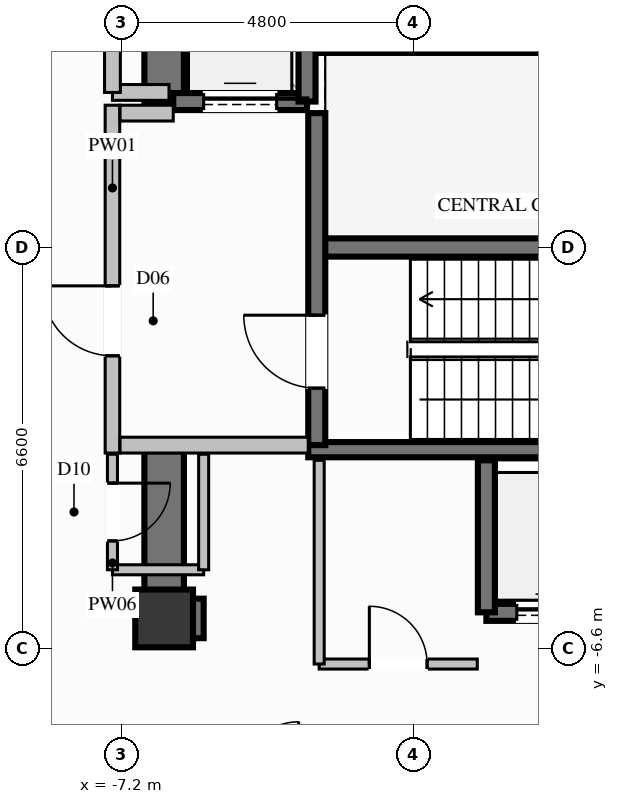
"""IFC4 building model, lengths in metres.
Left out: names, types, materials, properties, quantities, classifications, styles, units other than length and angle.
Written with IfcOpenShell. Run it as: python <this file> out.ifc"""

import sys

from ifc_helpers import new_model, si_unit, direction, frame, frame_2d, origin, origin_2d, place, context, subcontext, project, spatial, rectangle, extrude, element, fill, save


model = new_model("IFC4")
c1 = context("Model", 3, precision=1e-05, world=origin(), true_north=direction((0.0, 1.0)))
c2 = subcontext(c1, "Body", "Model", "MODEL_VIEW")
j1 = project(units=[si_unit("LENGTHUNIT", "METRE"), si_unit("PLANEANGLEUNIT", "RADIAN")], contexts=[c1])
p1 = place(None, origin())
s1 = spatial("IfcSite", under=j1, at=p1, CompositionType="ELEMENT")
p2 = place(p1, origin())
s2 = spatial("IfcBuilding", under=s1, at=p2, CompositionType="ELEMENT")
p3 = place(p2, frame((0.0, 0.0, 117.0)))
s3 = spatial("IfcBuildingStorey", under=s2, at=p3, CompositionType="ELEMENT", Elevation=117.0)
p4 = place(p3, frame((-6.5, -6.1, 0.0), z_axis=(0.0, 0.0, 1.0), x_axis=(1.0, 0.0, 0.0)))
e1 = element("IfcColumn", 1, at=p4, inside=s3, PredefinedType="COLUMN", context=c2, shape_type="SweptSolid", body=[
    extrude(rectangle(XDim=0.95, YDim=0.95, at=origin_2d()), origin(), (0.0, 0.0, 1.0), 3.6),
])
p5 = place(p3, frame((-3.99, 0.0, 0.0), z_axis=(0.0, 0.0, 1.0), x_axis=(1.0, 0.0, 0.0)))
e2 = element("IfcWall", 2, at=p5, inside=s3, PredefinedType="SHEAR", context=c2, shape_type="SweptSolid", body=[
    extrude(rectangle(XDim=7.98, YDim=0.3, at=frame_2d((3.99, 0.0))), origin(), (0.0, 0.0, 1.0), 3.6),
])
for number, where, z_axis, x_axis in (
    (3, (-4.13, -3.325, 0.0), (0.0, 0.0, 1.0), (1.0, 0.0, 0.0)),
    (4, (-4.13, 3.325, 0.0), (0.0, 0.0, 1.0), (1.0, 0.0, 0.0)),
):
    element("IfcWall", number, at=place(p3, frame(where, z_axis=z_axis, x_axis=x_axis)), inside=s3, PredefinedType="SOLIDWALL", context=c2, shape_type="SweptSolid", body=[
        extrude(rectangle(XDim=8.26, YDim=0.25, at=frame_2d((4.13, 0.0))), origin(), (0.0, 0.0, 1.0), 3.6),
    ])
p6 = place(p3, frame((-6.175, -6.1, 0.0), z_axis=(0.0, 0.0, 1.0), x_axis=(1.0, 0.0, 0.0)))
e5 = element("IfcWall", 5, at=p6, inside=s3, PredefinedType="SHEAR", context=c2, shape_type="SweptSolid", body=[
    extrude(rectangle(XDim=0.325, YDim=0.65, at=frame_2d((0.163, 0.0))), origin(), (0.0, 0.0, 1.0), 3.6),
])
p7 = place(p3, frame((-6.5, 2.35, 0.0), z_axis=(0.0, 0.0, 1.0), x_axis=(0.0, 1.0, 0.0)))
e6 = element("IfcWall", 6, at=p7, inside=s3, PredefinedType="SHEAR", context=c2, shape_type="SweptSolid", body=[
    extrude(rectangle(XDim=4.075, YDim=0.65, at=frame_2d((2.038, 0.0))), origin(), (0.0, 0.0, 1.0), 3.6),
])
p8 = place(p3, frame((-6.5, -6.425, 0.0), z_axis=(0.0, 0.0, 1.0), x_axis=(0.0, 1.0, 0.0)))
e7 = element("IfcWall", 7, at=p8, inside=s3, PredefinedType="SHEAR", context=c2, shape_type="SweptSolid", body=[
    extrude(rectangle(XDim=3.075, YDim=0.65, at=frame_2d((1.538, 0.0))), origin(), (0.0, 0.0, 1.0), 3.6),
])
p9 = place(p3, frame((-1.2, -6.0, 0.0), z_axis=(0.0, 0.0, 1.0), x_axis=(1.0, 0.0, 0.0)))
e8 = element("IfcWall", 8, at=p9, inside=s3, PredefinedType="SOLIDWALL", context=c2, shape_type="SweptSolid", body=[
    extrude(rectangle(XDim=2.1, YDim=0.28, at=frame_2d((1.05, 0.0))), origin(), (0.0, 0.0, 1.0), 3.35),
])
p10 = place(p9, frame((0.5, 0.0, 0.0)))
e9 = element("IfcOpeningElement", 9, at=p10, cuts=e8, PredefinedType="OPENING", context=c2, shape_type="SweptSolid", body=[
    extrude(rectangle(XDim=1.1, YDim=2.2, at=frame_2d((0.55, 1.1))), frame((0.0, 0.15, 0.0), z_axis=(0.0, -1.0, 0.0), x_axis=(1.0, 0.0, 0.0)), (0.0, 0.0, 1.0), 0.3),
])
p11 = place(p3, frame((-1.2, -3.5, 0.0), z_axis=(0.0, 0.0, 1.0), x_axis=(0.0, -1.0, 0.0)))
e10 = element("IfcWall", 10, at=p11, inside=s3, PredefinedType="SOLIDWALL", context=c2, shape_type="SweptSolid", body=[
    extrude(rectangle(XDim=2.5, YDim=0.28, at=frame_2d((1.25, 0.0))), origin(), (0.0, 0.0, 1.0), 3.35),
])
p12 = place(p3, frame((-6.35, 2.4, 0.0), z_axis=(0.0, 0.0, 1.0), x_axis=(1.0, 0.0, 0.0)))
e11 = element("IfcWall", 11, at=p12, inside=s3, PredefinedType="SOLIDWALL", context=c2, shape_type="SweptSolid", body=[
    extrude(rectangle(XDim=2.2, YDim=0.28, at=frame_2d((1.1, 0.0))), origin(), (0.0, 0.0, 1.0), 3.35),
])
p13 = place(p12, frame((0.5, 0.0, 0.0)))
e12 = element("IfcOpeningElement", 12, at=p13, cuts=e11, PredefinedType="OPENING", context=c2, shape_type="SweptSolid", body=[
    extrude(rectangle(XDim=1.2, YDim=2.2, at=frame_2d((0.6, 1.1))), frame((0.0, 0.15, 0.0), z_axis=(0.0, -1.0, 0.0), x_axis=(1.0, 0.0, 0.0)), (0.0, 0.0, 1.0), 0.3),
])
p14 = place(p3, frame((-4.15, 2.4, 0.0), z_axis=(0.0, 0.0, 1.0), x_axis=(0.0, 1.0, 0.0)))
e13 = element("IfcWall", 13, at=p14, inside=s3, PredefinedType="SOLIDWALL", context=c2, shape_type="SweptSolid", body=[
    extrude(rectangle(XDim=2.7, YDim=0.28, at=frame_2d((1.35, 0.0))), origin(), (0.0, 0.0, 1.0), 3.35),
])
p15 = place(p3, frame((-3.99, -3.25, 0.0), z_axis=(0.0, 0.0, 1.0), x_axis=(0.0, 1.0, 0.0)))
e14 = element("IfcWall", 14, at=p15, inside=s3, PredefinedType="SOLIDWALL", context=c2, shape_type="SweptSolid", body=[
    extrude(rectangle(XDim=5.46, YDim=0.28, at=frame_2d((2.73, 0.0))), origin(), (0.0, 0.0, 1.0), 3.35),
])
p16 = place(p15, frame((0.937, 0.0, 0.0)))
e15 = element("IfcOpeningElement", 15, at=p16, cuts=e14, PredefinedType="OPENING", context=c2, shape_type="SweptSolid", body=[
    extrude(rectangle(XDim=1.2, YDim=2.2, at=frame_2d((0.6, 1.1))), frame((0.0, 0.15, 0.0), z_axis=(0.0, -1.0, 0.0), x_axis=(1.0, 0.0, 0.0)), (0.0, 0.0, 1.0), 0.3),
])
p17 = place(p3, frame((-7.35, -3.38, 0.0), z_axis=(0.0, 0.0, 1.0), x_axis=(0.0, 1.0, 0.0)))
e16 = element("IfcWall", 16, at=p17, inside=s3, PredefinedType="PARTITIONING", context=c2, shape_type="SweptSolid", body=[
    extrude(rectangle(XDim=5.72, YDim=0.24, at=frame_2d((2.86, 0.0))), origin(), (0.0, 0.0, 1.0), 2.435),
])
p18 = place(p17, frame((1.599, 0.0, 0.0)))
e17 = element("IfcOpeningElement", 17, at=p18, cuts=e16, PredefinedType="OPENING", context=c2, shape_type="SweptSolid", body=[
    extrude(rectangle(XDim=1.15, YDim=2.2, at=frame_2d((0.575, 1.1))), frame((0.0, 0.13, 0.0), z_axis=(0.0, -1.0, 0.0), x_axis=(1.0, 0.0, 0.0)), (0.0, 0.0, 1.0), 0.26),
])
p19 = place(p3, frame((-7.225, -3.25, 0.0), z_axis=(0.0, 0.0, 1.0), x_axis=(1.0, 0.0, 0.0)))
e18 = element("IfcWall", 18, at=p19, inside=s3, PredefinedType="PARTITIONING", context=c2, shape_type="SweptSolid", body=[
    extrude(rectangle(XDim=3.095, YDim=0.26, at=frame_2d((1.548, 0.0))), origin(), (0.0, 0.0, 1.0), 3.35),
])
p20 = place(p3, frame((-7.225, 2.21, 0.0), z_axis=(0.0, 0.0, 1.0), x_axis=(1.0, 0.0, 0.0)))
e19 = element("IfcWall", 19, at=p20, inside=s3, PredefinedType="PARTITIONING", context=c2, shape_type="SweptSolid", body=[
    extrude(rectangle(XDim=0.875, YDim=0.26, at=frame_2d((0.438, 0.0))), origin(), (0.0, 0.0, 1.0), 3.35),
])
p21 = place(p3, frame((-7.35, 2.55, 0.0), z_axis=(0.0, 0.0, 1.0), x_axis=(1.0, 0.0, 0.0)))
e20 = element("IfcWall", 20, at=p21, inside=s3, PredefinedType="PARTITIONING", context=c2, shape_type="SweptSolid", body=[
    extrude(rectangle(XDim=0.93, YDim=0.26, at=frame_2d((0.465, 0.0))), origin(), (0.0, 0.0, 1.0), 3.35),
])
p22 = place(p3, frame((-7.35, 2.55, 0.0), z_axis=(0.0, 0.0, 1.0), x_axis=(0.0, 1.0, 0.0)))
e21 = element("IfcWall", 21, at=p22, inside=s3, PredefinedType="PARTITIONING", context=c2, shape_type="SweptSolid", body=[
    extrude(rectangle(XDim=2.4, YDim=0.26, at=frame_2d((1.2, 0.0))), origin(), (0.0, 0.0, 1.0), 2.435),
])
p23 = place(p22, frame((0.775, 0.0, 0.0)))
e22 = element("IfcOpeningElement", 22, at=p23, cuts=e21, PredefinedType="OPENING", context=c2, shape_type="SweptSolid", body=[
    extrude(rectangle(XDim=0.85, YDim=2.05, at=frame_2d((0.425, 1.025))), frame((0.0, 0.14, 0.0), z_axis=(0.0, -1.0, 0.0), x_axis=(1.0, 0.0, 0.0)), (0.0, 0.0, 1.0), 0.28),
])
p24 = place(p3, frame((-7.35, -5.3, 0.0), z_axis=(0.0, 0.0, 1.0), x_axis=(1.0, 0.0, 0.0)))
e23 = element("IfcWall", 23, at=p24, inside=s3, PredefinedType="PARTITIONING", context=c2, shape_type="SweptSolid", body=[
    extrude(rectangle(XDim=1.5, YDim=0.165, at=frame_2d((0.75, 0.0))), origin(), (0.0, 0.0, 1.0), 2.435),
])
p25 = place(p3, frame((-5.85, -5.3, 0.0), z_axis=(0.0, 0.0, 1.0), x_axis=(0.0, 1.0, 0.0)))
e24 = element("IfcWall", 24, at=p25, inside=s3, PredefinedType="PARTITIONING", context=c2, shape_type="SweptSolid", body=[
    extrude(rectangle(XDim=1.9, YDim=0.165, at=frame_2d((0.95, 0.0))), origin(), (0.0, 0.0, 1.0), 2.435),
])
p26 = place(p3, frame((-7.35, -3.4, 0.0), z_axis=(0.0, 0.0, 1.0), x_axis=(0.0, -1.0, 0.0)))
e25 = element("IfcWall", 25, at=p26, inside=s3, PredefinedType="PARTITIONING", context=c2, shape_type="SweptSolid", body=[
    extrude(rectangle(XDim=1.9, YDim=0.165, at=frame_2d((0.95, 0.0))), origin(), (0.0, 0.0, 1.0), 3.35),
])
p27 = place(p26, frame((0.475, 0.0, 0.0)))
e26 = element("IfcOpeningElement", 26, at=p27, cuts=e25, PredefinedType="OPENING", context=c2, shape_type="SweptSolid", body=[
    extrude(rectangle(XDim=0.95, YDim=2.1, at=frame_2d((0.475, 1.05))), frame((0.0, 0.093, 0.0), z_axis=(0.0, -1.0, 0.0), x_axis=(1.0, 0.0, 0.0)), (0.0, 0.0, 1.0), 0.185),
])
p28 = place(p3, frame((-3.95, -6.85, 0.0), z_axis=(0.0, 0.0, 1.0), x_axis=(1.0, 0.0, 0.0)))
e27 = element("IfcWall", 27, at=p28, inside=s3, PredefinedType="PARTITIONING", context=c2, shape_type="SweptSolid", body=[
    extrude(rectangle(XDim=2.6, YDim=0.165, at=frame_2d((1.3, 0.0))), origin(), (0.0, 0.0, 1.0), 2.435),
])
p29 = place(p28, frame((0.825, 0.0, 0.0)))
e28 = element("IfcOpeningElement", 28, at=p29, cuts=e27, PredefinedType="OPENING", context=c2, shape_type="SweptSolid", body=[
    extrude(rectangle(XDim=0.95, YDim=2.1, at=frame_2d((0.475, 1.05))), frame((0.0, 0.093, 0.0), z_axis=(0.0, -1.0, 0.0), x_axis=(1.0, 0.0, 0.0)), (0.0, 0.0, 1.0), 0.185),
])
p30 = place(p3, frame((-3.95, -3.5, 0.0), z_axis=(0.0, 0.0, 1.0), x_axis=(0.0, -1.0, 0.0)))
e29 = element("IfcWall", 29, at=p30, inside=s3, PredefinedType="PARTITIONING", context=c2, shape_type="SweptSolid", body=[
    extrude(rectangle(XDim=3.35, YDim=0.165, at=frame_2d((1.675, 0.0))), origin(), (0.0, 0.0, 1.0), 3.35),
])
p31 = place(p10, origin())
e30 = element("IfcDoor", 30, at=p31, inside=s3, OperationType="SLIDING_TO_LEFT", PredefinedType="DOOR", context=c2, shape_type="SweptSolid", body=[
    extrude(rectangle(XDim=1.1, YDim=2.2, at=frame_2d((0.55, 1.1))), frame((0.0, 0.025, 0.0), z_axis=(0.0, -1.0, 0.0), x_axis=(1.0, 0.0, 0.0)), (0.0, 0.0, 1.0), 0.05),
])
fill(e9, e30)
p32 = place(p13, origin())
e31 = element("IfcDoor", 31, at=p32, inside=s3, OperationType="SLIDING_TO_LEFT", PredefinedType="DOOR", context=c2, shape_type="SweptSolid", body=[
    extrude(rectangle(XDim=1.2, YDim=2.2, at=frame_2d((0.6, 1.1))), frame((0.0, 0.025, 0.0), z_axis=(0.0, -1.0, 0.0), x_axis=(1.0, 0.0, 0.0)), (0.0, 0.0, 1.0), 0.05),
])
fill(e12, e31)
p33 = place(p16, origin())
e32 = element("IfcDoor", 32, at=p33, inside=s3, OperationType="SINGLE_SWING_RIGHT", PredefinedType="DOOR", context=c2, shape_type="SweptSolid", body=[
    extrude(rectangle(XDim=1.2, YDim=2.2, at=frame_2d((0.6, 1.1))), frame((0.0, 0.025, 0.0), z_axis=(0.0, -1.0, 0.0), x_axis=(1.0, 0.0, 0.0)), (0.0, 0.0, 1.0), 0.05),
])
fill(e15, e32)
p34 = place(p18, origin())
e33 = element("IfcDoor", 33, at=p34, inside=s3, OperationType="SINGLE_SWING_RIGHT", PredefinedType="DOOR", context=c2, shape_type="SweptSolid", body=[
    extrude(rectangle(XDim=1.15, YDim=2.2, at=frame_2d((0.575, 1.1))), frame((0.0, 0.025, 0.0), z_axis=(0.0, -1.0, 0.0), x_axis=(1.0, 0.0, 0.0)), (0.0, 0.0, 1.0), 0.05),
])
fill(e17, e33)
p35 = place(p27, origin())
e34 = element("IfcDoor", 34, at=p35, inside=s3, OperationType="SINGLE_SWING_LEFT", PredefinedType="DOOR", context=c2, shape_type="SweptSolid", body=[
    extrude(rectangle(XDim=0.95, YDim=2.1, at=frame_2d((0.475, 1.05))), frame((0.0, 0.025, 0.0), z_axis=(0.0, -1.0, 0.0), x_axis=(1.0, 0.0, 0.0)), (0.0, 0.0, 1.0), 0.05),
])
fill(e26, e34)
p36 = place(p29, origin())
e35 = element("IfcDoor", 35, at=p36, inside=s3, OperationType="SINGLE_SWING_LEFT", PredefinedType="DOOR", context=c2, shape_type="SweptSolid", body=[
    extrude(rectangle(XDim=0.95, YDim=2.1, at=frame_2d((0.475, 1.05))), frame((0.0, 0.025, 0.0), z_axis=(0.0, -1.0, 0.0), x_axis=(1.0, 0.0, 0.0)), (0.0, 0.0, 1.0), 0.05),
])
fill(e28, e35)
save(model, sys.argv[1])
